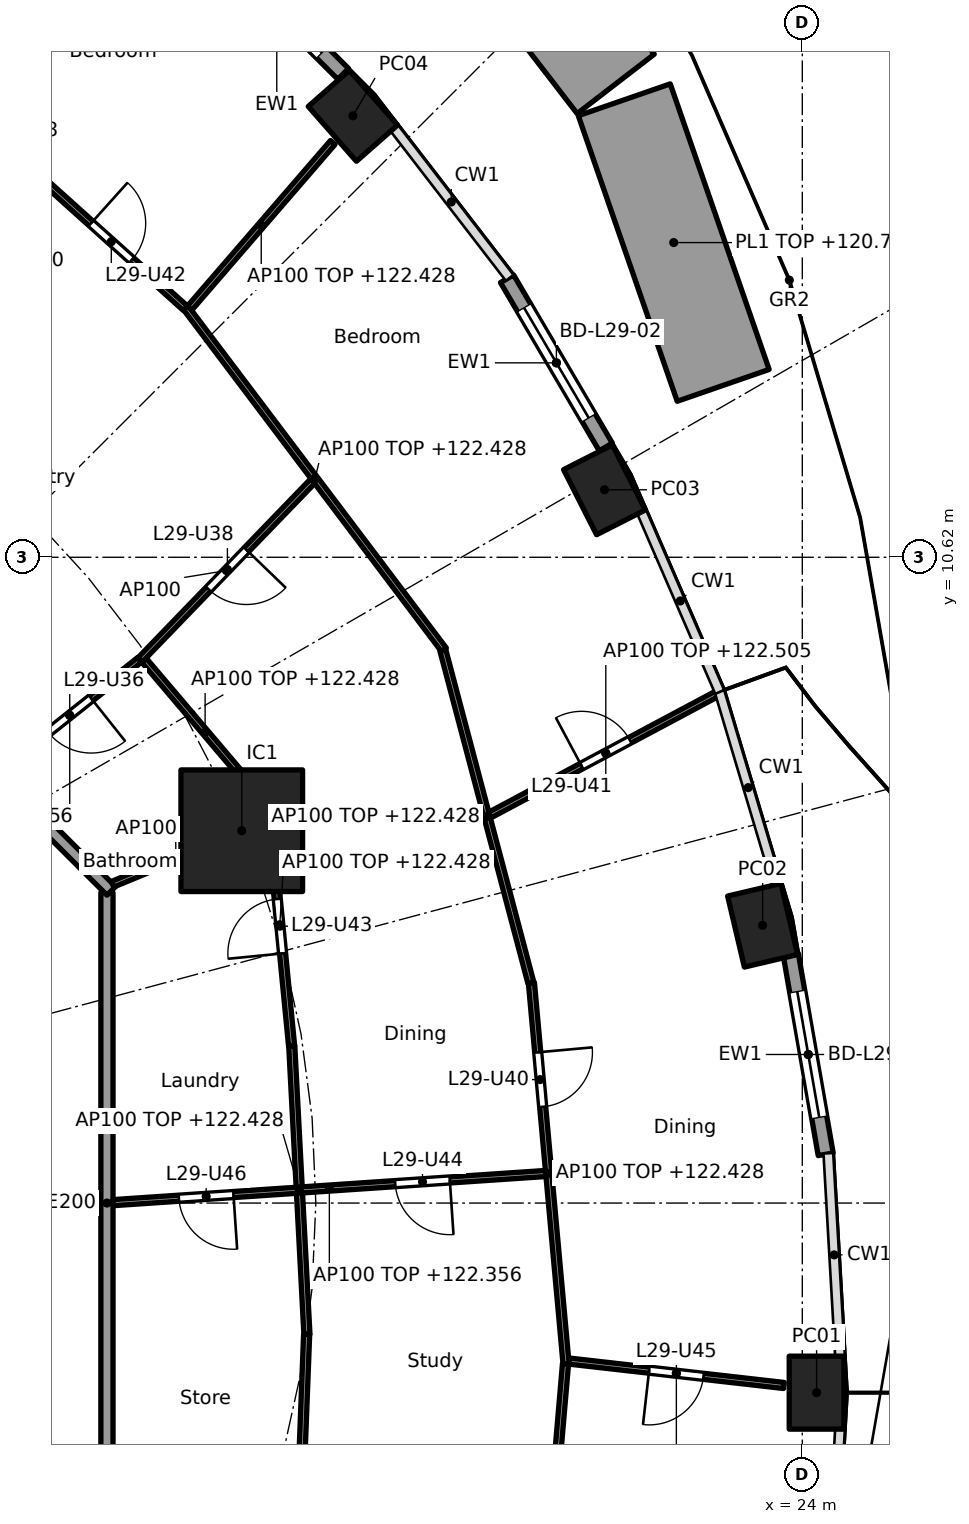
"""IFC4 building model, lengths in metres.
Left out: names, types, materials, properties, quantities, classifications, styles, units other than length and angle.
Written with IfcOpenShell. Run it as: python <this file> out.ifc"""

import sys

from ifc_helpers import new_model, si_unit, direction, frame, frame_2d, origin, origin_2d, place, context, subcontext, project, spatial, rectangle, hollow_rectangle, extrude, element, fill, save


model = new_model("IFC4")
c1 = context("Model", 3, precision=1e-05, world=origin(), true_north=direction((0.0, 1.0)))
c2 = subcontext(c1, "Body", "Model", "MODEL_VIEW")
j1 = project(units=[si_unit("LENGTHUNIT", "METRE"), si_unit("PLANEANGLEUNIT", "RADIAN")], contexts=[c1])
p1 = place(None, origin())
s1 = spatial("IfcSite", under=j1, at=p1, CompositionType="ELEMENT")
p2 = place(p1, origin())
s2 = spatial("IfcBuilding", under=s1, at=p2, CompositionType="ELEMENT")
p3 = place(p2, frame((0.0, 0.0, 119.6)))
s3 = spatial("IfcBuildingStorey", under=s2, at=p3, CompositionType="ELEMENT", Elevation=119.6)
for number, where, z_axis, x_axis in (
    (1, (24.235, -3.118, -0.26), (0.0, 0.0, 1.0), (0.0, 1.0, 0.0)),
    (2, (23.348, 4.568, -0.26), (0.0, 0.0, 1.0), (-0.229, 0.973, 0.0)),
    (3, (20.747, 11.73, -0.26), (0.0, 0.0, 1.0), (-0.452, 0.892, 0.0)),
    (4, (16.61, 17.88, -0.26), (0.0, 0.0, 1.0), (-0.66, 0.751, 0.0)),
):
    element("IfcColumn", number, at=place(p3, frame(where, z_axis=z_axis, x_axis=x_axis)), inside=s3, PredefinedType="COLUMN", context=c2, shape_type="SweptSolid", body=[
        extrude(hollow_rectangle(XDim=1.2, YDim=0.9, WallThickness=0.04, at=origin_2d()), origin(), (0.0, 0.0, 1.0), 3.96),
    ])
p4 = place(p3, frame((14.782, 6.123, 0.0), z_axis=(0.0, 0.0, 1.0), x_axis=(1.0, 0.0, 0.0)))
e5 = element("IfcColumn", 5, at=p4, inside=s3, PredefinedType="COLUMN", context=c2, shape_type="SweptSolid", body=[
    extrude(rectangle(XDim=2.0, YDim=2.0, at=origin_2d()), origin(), (0.0, 0.0, 1.0), 3.7),
])
p5 = place(p3, frame((23.811, 4.085, 0.0), z_axis=(0.0, 0.0, 1.0), x_axis=(0.172163521006, -0.985068384446, 0.0)))
e6 = element("IfcWall", 6, at=p5, inside=s3, PredefinedType="SOLIDWALL", context=c2, shape_type="SweptSolid", body=[
    extrude(rectangle(XDim=3.333, YDim=0.25, at=frame_2d((1.666, 0.0))), origin(), (0.0, 0.0, 1.0), 3.44),
])
p6 = place(p5, frame((0.616, 0.0, 0.0)))
e7 = element("IfcOpeningElement", 7, at=p6, cuts=e6, PredefinedType="OPENING", context=c2, shape_type="SweptSolid", body=[
    extrude(rectangle(XDim=2.1, YDim=2.4, at=frame_2d((1.05, 1.2))), frame((0.0, 0.135, 0.0), z_axis=(0.0, -1.0, 0.0), x_axis=(1.0, 0.0, 0.0)), (0.0, 0.0, 1.0), 0.27),
])
p7 = place(p3, frame((19.144, 15.201, 0.0), z_axis=(0.0, 0.0, 1.0), x_axis=(0.506314982873, -0.862348617508, 0.0)))
e8 = element("IfcWall", 8, at=p7, inside=s3, PredefinedType="SOLIDWALL", context=c2, shape_type="SweptSolid", body=[
    extrude(rectangle(XDim=3.208, YDim=0.25, at=frame_2d((1.604, 0.0))), origin(), (0.0, 0.0, 1.0), 3.44),
])
p8 = place(p7, frame((0.554, 0.0, 0.0)))
e9 = element("IfcOpeningElement", 9, at=p8, cuts=e8, PredefinedType="OPENING", context=c2, shape_type="SweptSolid", body=[
    extrude(rectangle(XDim=2.1, YDim=2.4, at=frame_2d((1.05, 1.2))), frame((0.0, 0.135, 0.0), z_axis=(0.0, -1.0, 0.0), x_axis=(1.0, 0.0, 0.0)), (0.0, 0.0, 1.0), 0.27),
])
p9 = place(p3, frame((14.265, 20.749, 0.0), z_axis=(0.0, 0.0, 1.0), x_axis=(0.70789728551, -0.706315392135, 0.0)))
e10 = element("IfcWall", 10, at=p9, inside=s3, PredefinedType="SOLIDWALL", context=c2, shape_type="SweptSolid", body=[
    extrude(rectangle(XDim=3.087, YDim=0.25, at=frame_2d((1.543, 0.0))), origin(), (0.0, 0.0, 1.0), 3.44),
])
p10 = place(p9, frame((0.493, 0.0, 0.0)))
e11 = element("IfcOpeningElement", 11, at=p10, cuts=e10, PredefinedType="OPENING", context=c2, shape_type="SweptSolid", body=[
    extrude(rectangle(XDim=2.1, YDim=2.4, at=frame_2d((1.05, 1.2))), frame((0.0, 0.135, 0.0), z_axis=(0.0, -1.0, 0.0), x_axis=(1.0, 0.0, 0.0)), (0.0, 0.0, 1.0), 0.27),
])
p11 = place(p3, frame((14.315, 26.993, 0.0), z_axis=(0.0, 0.0, 1.0), x_axis=(0.610279766338, -0.792185967307, 0.0)))
e12 = element("IfcWall", 12, at=p11, inside=s3, PredefinedType="SOLIDWALL", context=c2, shape_type="SweptSolid", body=[
    extrude(rectangle(XDim=10.842, YDim=1.6, at=frame_2d((5.421, 0.0))), origin(), (0.0, 0.0, 1.0), 1.1),
])
p12 = place(p3, frame((21.073, 18.143, 0.0), z_axis=(0.0, 0.0, 1.0), x_axis=(0.327215169459, -0.944949857334, 0.0)))
e13 = element("IfcWall", 13, at=p12, inside=s3, PredefinedType="SOLIDWALL", context=c2, shape_type="SweptSolid", body=[
    extrude(rectangle(XDim=4.97, YDim=1.6, at=frame_2d((2.485, 0.0))), origin(), (0.0, 0.0, 1.0), 1.1),
])
p13 = place(p3, frame((12.565, -5.104, 0.0), z_axis=(0.0, 0.0, 1.0), x_axis=(0.0, 1.0, 0.0)))
e14 = element("IfcWall", 14, at=p13, inside=s3, PredefinedType="PARTITIONING", context=c2, shape_type="SweptSolid", body=[
    extrude(rectangle(XDim=10.209, YDim=0.2, at=frame_2d((5.104, 0.0))), origin(), (0.0, 0.0, 1.0), 3.44),
])
p14 = place(p3, frame((12.635, 5.134, 0.0), z_axis=(0.0, 0.0, 1.0), x_axis=(-0.707106781187, 0.707106781187, 0.0)))
e15 = element("IfcWall", 15, at=p14, inside=s3, PredefinedType="PARTITIONING", context=c2, shape_type="SweptSolid", body=[
    extrude(rectangle(XDim=10.609, YDim=0.2, at=frame_2d((5.305, 0.0))), origin(), (0.0, 0.0, 1.0), 3.44),
])
p15 = place(p14, frame((4.804, 0.0, 0.0)))
e16 = element("IfcOpeningElement", 16, at=p15, cuts=e15, PredefinedType="OPENING", context=c2, shape_type="SweptSolid", body=[
    extrude(rectangle(XDim=1.0, YDim=2.1, at=frame_2d((0.5, 1.05))), frame((0.0, 0.11, 0.0), z_axis=(0.0, -1.0, 0.0), x_axis=(1.0, 0.0, 0.0)), (0.0, 0.0, 1.0), 0.22),
])
p16 = place(p3, frame((15.853, -2.158, 0.0), z_axis=(0.0, 0.0, 1.0), x_axis=(-0.052483289253, 0.99862180246, 0.0)))
e17 = element("IfcWall", 17, at=p16, inside=s3, PredefinedType="PARTITIONING", context=c2, shape_type="SweptSolid", body=[
    extrude(rectangle(XDim=4.75, YDim=0.1, at=frame_2d((2.375, 0.0))), origin(), (0.0, 0.0, 1.0), 2.828),
])
p17 = place(p3, frame((15.849, -2.158, 0.0), z_axis=(0.0, 0.0, 1.0), x_axis=(-0.038390448414, -0.999262815014, 0.0)))
e18 = element("IfcWall", 18, at=p17, inside=s3, PredefinedType="PARTITIONING", context=c2, shape_type="SweptSolid", body=[
    extrude(rectangle(XDim=4.394, YDim=0.1, at=frame_2d((2.197, 0.0))), origin(), (0.0, 0.0, 1.0), 3.44),
])
p18 = place(p3, frame((20.16, -2.598, 0.0), z_axis=(0.0, 0.0, 1.0), x_axis=(0.993610673305, -0.112861994911, 0.0)))
e19 = element("IfcWall", 19, at=p18, inside=s3, PredefinedType="PARTITIONING", context=c2, shape_type="SweptSolid", body=[
    extrude(rectangle(XDim=3.561, YDim=0.1, at=frame_2d((1.78, 0.0))), origin(), (0.0, 0.0, 1.0), 2.828),
])
p19 = place(p18, frame((1.33, 0.0, 0.0)))
e20 = element("IfcOpeningElement", 20, at=p19, cuts=e19, PredefinedType="OPENING", context=c2, shape_type="SweptSolid", body=[
    extrude(rectangle(XDim=0.9, YDim=2.1, at=frame_2d((0.45, 1.05))), frame((0.0, 0.06, 0.0), z_axis=(0.0, -1.0, 0.0), x_axis=(1.0, 0.0, 0.0)), (0.0, 0.0, 1.0), 0.12),
])
p20 = place(p3, frame((20.115, -2.642, 0.0), z_axis=(0.0, 0.0, 1.0), x_axis=(-0.090563746294, 0.995890660593, 0.0)))
e21 = element("IfcWall", 21, at=p20, inside=s3, PredefinedType="PARTITIONING", context=c2, shape_type="SweptSolid", body=[
    extrude(rectangle(XDim=6.289, YDim=0.1, at=frame_2d((3.145, 0.0))), origin(), (0.0, 0.0, 1.0), 2.828),
])
p21 = place(p20, frame((4.242, 0.0, 0.0)))
e22 = element("IfcOpeningElement", 22, at=p21, cuts=e21, PredefinedType="OPENING", context=c2, shape_type="SweptSolid", body=[
    extrude(rectangle(XDim=0.9, YDim=2.1, at=frame_2d((0.45, 1.05))), frame((0.0, 0.06, 0.0), z_axis=(0.0, -1.0, 0.0), x_axis=(1.0, 0.0, 0.0)), (0.0, 0.0, 1.0), 0.12),
])
p22 = place(p3, frame((20.106, -2.642, 0.0), z_axis=(0.0, 0.0, 1.0), x_axis=(-0.085672025822, -0.996323393277, 0.0)))
e23 = element("IfcWall", 23, at=p22, inside=s3, PredefinedType="PARTITIONING", context=c2, shape_type="SweptSolid", body=[
    extrude(rectangle(XDim=6.007, YDim=0.1, at=frame_2d((3.003, 0.0))), origin(), (0.0, 0.0, 1.0), 2.828),
])
p23 = place(p3, frame((12.665, 0.007, 0.0), z_axis=(0.0, 0.0, 1.0), x_axis=(0.997737186236, 0.067234717233, 0.0)))
e24 = element("IfcWall", 24, at=p23, inside=s3, PredefinedType="PARTITIONING", context=c2, shape_type="SweptSolid", body=[
    extrude(rectangle(XDim=7.132, YDim=0.1, at=frame_2d((3.566, 0.0))), origin(), (0.0, 0.0, 1.0), 2.756),
])
p24 = place(p23, frame((4.651, 0.0, 0.0)))
e25 = element("IfcOpeningElement", 25, at=p24, cuts=e24, PredefinedType="OPENING", context=c2, shape_type="SweptSolid", body=[
    extrude(rectangle(XDim=0.9, YDim=2.1, at=frame_2d((0.45, 1.05))), frame((0.0, 0.06, 0.0), z_axis=(0.0, -1.0, 0.0), x_axis=(1.0, 0.0, 0.0)), (0.0, 0.0, 1.0), 0.12),
])
p25 = place(p23, frame((1.085, 0.0, 0.0)))
e26 = element("IfcOpeningElement", 26, at=p25, cuts=e24, PredefinedType="OPENING", context=c2, shape_type="SweptSolid", body=[
    extrude(rectangle(XDim=0.9, YDim=2.1, at=frame_2d((0.45, 1.05))), frame((0.0, 0.06, 0.0), z_axis=(0.0, -1.0, 0.0), x_axis=(1.0, 0.0, 0.0)), (0.0, 0.0, 1.0), 0.12),
])
p26 = place(p3, frame((15.602, 2.584, 0.0), z_axis=(0.0, 0.0, 1.0), x_axis=(-0.097216297846, 0.995263277446, 0.0)))
e27 = element("IfcWall", 27, at=p26, inside=s3, PredefinedType="PARTITIONING", context=c2, shape_type="SweptSolid", body=[
    extrude(rectangle(XDim=4.006, YDim=0.1, at=frame_2d((2.003, 0.0))), origin(), (0.0, 0.0, 1.0), 2.828),
])
p27 = place(p26, frame((1.528, 0.0, 0.0)))
e28 = element("IfcOpeningElement", 28, at=p27, cuts=e27, PredefinedType="OPENING", context=c2, shape_type="SweptSolid", body=[
    extrude(rectangle(XDim=0.9, YDim=2.1, at=frame_2d((0.45, 1.05))), frame((0.0, 0.06, 0.0), z_axis=(0.0, -1.0, 0.0), x_axis=(1.0, 0.0, 0.0)), (0.0, 0.0, 1.0), 0.12),
])
p28 = place(p3, frame((19.537, 3.62, 0.0), z_axis=(0.0, 0.0, 1.0), x_axis=(-0.255892560316, 0.966705227862, 0.0)))
e29 = element("IfcWall", 29, at=p28, inside=s3, PredefinedType="PARTITIONING", context=c2, shape_type="SweptSolid", body=[
    extrude(rectangle(XDim=5.659, YDim=0.1, at=frame_2d((2.829, 0.0))), origin(), (0.0, 0.0, 1.0), 2.828),
])
p29 = place(p3, frame((18.857, 6.378, 0.0), z_axis=(0.0, 0.0, 1.0), x_axis=(0.882223462934, 0.470830926607, 0.0)))
e30 = element("IfcWall", 30, at=p29, inside=s3, PredefinedType="PARTITIONING", context=c2, shape_type="SweptSolid", body=[
    extrude(rectangle(XDim=4.333, YDim=0.1, at=frame_2d((2.167, 0.0))), origin(), (0.0, 0.0, 1.0), 2.905),
])
p30 = place(p29, frame((1.717, 0.0, 0.0)))
e31 = element("IfcOpeningElement", 31, at=p30, cuts=e30, PredefinedType="OPENING", context=c2, shape_type="SweptSolid", body=[
    extrude(rectangle(XDim=0.9, YDim=2.1, at=frame_2d((0.45, 1.05))), frame((0.0, 0.06, 0.0), z_axis=(0.0, -1.0, 0.0), x_axis=(1.0, 0.0, 0.0)), (0.0, 0.0, 1.0), 0.12),
])
p31 = place(p3, frame((12.657, 5.243, 0.0), z_axis=(0.0, 0.0, 1.0), x_axis=(0.923864733477, 0.382719158442, 0.0)))
e32 = element("IfcWall", 32, at=p31, inside=s3, PredefinedType="PARTITIONING", context=c2, shape_type="SweptSolid", body=[
    extrude(rectangle(XDim=2.25, YDim=0.1, at=frame_2d((1.125, 0.0))), origin(), (0.0, 0.0, 1.0), 3.44),
])
p32 = place(p3, frame((15.185, 6.559, 0.0), z_axis=(0.0, 0.0, 1.0), x_axis=(-0.647360926376, 0.762183594026, 0.0)))
e33 = element("IfcWall", 33, at=p32, inside=s3, PredefinedType="PARTITIONING", context=c2, shape_type="SweptSolid", body=[
    extrude(rectangle(XDim=3.106, YDim=0.1, at=frame_2d((1.553, 0.0))), origin(), (0.0, 0.0, 1.0), 2.828),
])
p33 = place(p3, frame((18.106, 9.098, 0.0), z_axis=(0.0, 0.0, 1.0), x_axis=(-0.602398572907, 0.798195439325, 0.0)))
e34 = element("IfcWall", 34, at=p33, inside=s3, PredefinedType="PARTITIONING", context=c2, shape_type="SweptSolid", body=[
    extrude(rectangle(XDim=7.044, YDim=0.1, at=frame_2d((3.522, 0.0))), origin(), (0.0, 0.0, 1.0), 2.828),
])
p34 = place(p3, frame((10.803, 7.107, 0.0), z_axis=(0.0, 0.0, 1.0), x_axis=(0.782908385935, 0.622137010017, 0.0)))
e35 = element("IfcWall", 35, at=p34, inside=s3, PredefinedType="PARTITIONING", context=c2, shape_type="SweptSolid", body=[
    extrude(rectangle(XDim=2.937, YDim=0.1, at=frame_2d((1.469, 0.0))), origin(), (0.0, 0.0, 1.0), 2.756),
])
p35 = place(p34, frame((1.019, 0.0, 0.0)))
e36 = element("IfcOpeningElement", 36, at=p35, cuts=e35, PredefinedType="OPENING", context=c2, shape_type="SweptSolid", body=[
    extrude(rectangle(XDim=0.9, YDim=2.1, at=frame_2d((0.45, 1.05))), frame((0.0, 0.06, 0.0), z_axis=(0.0, -1.0, 0.0), x_axis=(1.0, 0.0, 0.0)), (0.0, 0.0, 1.0), 0.12),
])
p36 = place(p3, frame((13.107, 8.929, 0.0), z_axis=(0.0, 0.0, 1.0), x_axis=(0.694592384931, 0.719403515974, 0.0)))
e37 = element("IfcWall", 37, at=p36, inside=s3, PredefinedType="PARTITIONING", context=c2, shape_type="SweptSolid", body=[
    extrude(rectangle(XDim=4.094, YDim=0.1, at=frame_2d((2.047, 0.0))), origin(), (0.0, 0.0, 1.0), 3.44),
])
p37 = place(p36, frame((1.622, 0.0, 0.0)))
e38 = element("IfcOpeningElement", 38, at=p37, cuts=e37, PredefinedType="OPENING", context=c2, shape_type="SweptSolid", body=[
    extrude(rectangle(XDim=0.9, YDim=2.1, at=frame_2d((0.45, 1.05))), frame((0.0, 0.06, 0.0), z_axis=(0.0, -1.0, 0.0), x_axis=(1.0, 0.0, 0.0)), (0.0, 0.0, 1.0), 0.12),
])
p38 = place(p3, frame((13.926, 14.719, 0.0), z_axis=(0.0, 0.0, 1.0), x_axis=(0.653831857253, 0.756639876323, 0.0)))
e39 = element("IfcWall", 39, at=p38, inside=s3, PredefinedType="PARTITIONING", context=c2, shape_type="SweptSolid", body=[
    extrude(rectangle(XDim=3.598, YDim=0.1, at=frame_2d((1.799, 0.0))), origin(), (0.0, 0.0, 1.0), 2.828),
])
p39 = place(p3, frame((13.856, 14.714, 0.0), z_axis=(0.0, 0.0, 1.0), x_axis=(-0.743799395746, 0.668402916577, 0.0)))
e40 = element("IfcWall", 40, at=p39, inside=s3, PredefinedType="PARTITIONING", context=c2, shape_type="SweptSolid", body=[
    extrude(rectangle(XDim=6.509, YDim=0.1, at=frame_2d((3.254, 0.0))), origin(), (0.0, 0.0, 1.0), 2.828),
])
p40 = place(p39, frame((1.19, 0.0, 0.0)))
e41 = element("IfcOpeningElement", 41, at=p40, cuts=e40, PredefinedType="OPENING", context=c2, shape_type="SweptSolid", body=[
    extrude(rectangle(XDim=0.9, YDim=2.1, at=frame_2d((0.45, 1.05))), frame((0.0, 0.06, 0.0), z_axis=(0.0, -1.0, 0.0), x_axis=(1.0, 0.0, 0.0)), (0.0, 0.0, 1.0), 0.12),
])
p41 = place(p6, origin())
e42 = element("IfcDoor", 42, at=p41, inside=s3, OperationType="SLIDING_TO_LEFT", PredefinedType="DOOR", context=c2, shape_type="SweptSolid", body=[
    extrude(rectangle(XDim=2.1, YDim=2.4, at=frame_2d((1.05, 1.2))), frame((0.0, 0.025, 0.0), z_axis=(0.0, -1.0, 0.0), x_axis=(1.0, 0.0, 0.0)), (0.0, 0.0, 1.0), 0.05),
])
fill(e7, e42)
p42 = place(p8, origin())
e43 = element("IfcDoor", 43, at=p42, inside=s3, OperationType="SLIDING_TO_LEFT", PredefinedType="DOOR", context=c2, shape_type="SweptSolid", body=[
    extrude(rectangle(XDim=2.1, YDim=2.4, at=frame_2d((1.05, 1.2))), frame((0.0, 0.025, 0.0), z_axis=(0.0, -1.0, 0.0), x_axis=(1.0, 0.0, 0.0)), (0.0, 0.0, 1.0), 0.05),
])
fill(e9, e43)
p43 = place(p10, origin())
e44 = element("IfcDoor", 44, at=p43, inside=s3, OperationType="SLIDING_TO_LEFT", PredefinedType="DOOR", context=c2, shape_type="SweptSolid", body=[
    extrude(rectangle(XDim=2.1, YDim=2.4, at=frame_2d((1.05, 1.2))), frame((0.0, 0.025, 0.0), z_axis=(0.0, -1.0, 0.0), x_axis=(1.0, 0.0, 0.0)), (0.0, 0.0, 1.0), 0.05),
])
fill(e11, e44)
p44 = place(p35, frame((0.9, 0.0, 0.0), x_axis=(-1.0, 0.0, 0.0)))
e45 = element("IfcDoor", 45, at=p44, inside=s3, OperationType="SINGLE_SWING_LEFT", PredefinedType="DOOR", context=c2, shape_type="SweptSolid", body=[
    extrude(rectangle(XDim=0.9, YDim=2.1, at=frame_2d((0.45, 1.05))), frame((0.0, 0.025, 0.0), z_axis=(0.0, -1.0, 0.0), x_axis=(1.0, 0.0, 0.0)), (0.0, 0.0, 1.0), 0.05),
])
fill(e36, e45)
p45 = place(p37, frame((0.9, 0.0, 0.0), x_axis=(-1.0, 0.0, 0.0)))
e46 = element("IfcDoor", 46, at=p45, inside=s3, OperationType="SINGLE_SWING_LEFT", PredefinedType="DOOR", context=c2, shape_type="SweptSolid", body=[
    extrude(rectangle(XDim=0.9, YDim=2.1, at=frame_2d((0.45, 1.05))), frame((0.0, 0.025, 0.0), z_axis=(0.0, -1.0, 0.0), x_axis=(1.0, 0.0, 0.0)), (0.0, 0.0, 1.0), 0.05),
])
fill(e38, e46)
p46 = place(p21, frame((0.9, 0.0, 0.0), x_axis=(-1.0, 0.0, 0.0)))
e47 = element("IfcDoor", 47, at=p46, inside=s3, OperationType="SINGLE_SWING_LEFT", PredefinedType="DOOR", context=c2, shape_type="SweptSolid", body=[
    extrude(rectangle(XDim=0.9, YDim=2.1, at=frame_2d((0.45, 1.05))), frame((0.0, 0.025, 0.0), z_axis=(0.0, -1.0, 0.0), x_axis=(1.0, 0.0, 0.0)), (0.0, 0.0, 1.0), 0.05),
])
fill(e22, e47)
p47 = place(p30, origin())
e48 = element("IfcDoor", 48, at=p47, inside=s3, OperationType="SINGLE_SWING_LEFT", PredefinedType="DOOR", context=c2, shape_type="SweptSolid", body=[
    extrude(rectangle(XDim=0.9, YDim=2.1, at=frame_2d((0.45, 1.05))), frame((0.0, 0.025, 0.0), z_axis=(0.0, -1.0, 0.0), x_axis=(1.0, 0.0, 0.0)), (0.0, 0.0, 1.0), 0.05),
])
fill(e31, e48)
p48 = place(p40, frame((0.9, 0.0, 0.0), x_axis=(-1.0, 0.0, 0.0)))
e49 = element("IfcDoor", 49, at=p48, inside=s3, OperationType="SINGLE_SWING_LEFT", PredefinedType="DOOR", context=c2, shape_type="SweptSolid", body=[
    extrude(rectangle(XDim=0.9, YDim=2.1, at=frame_2d((0.45, 1.05))), frame((0.0, 0.025, 0.0), z_axis=(0.0, -1.0, 0.0), x_axis=(1.0, 0.0, 0.0)), (0.0, 0.0, 1.0), 0.05),
])
fill(e41, e49)
p49 = place(p27, origin())
e50 = element("IfcDoor", 50, at=p49, inside=s3, OperationType="SINGLE_SWING_LEFT", PredefinedType="DOOR", context=c2, shape_type="SweptSolid", body=[
    extrude(rectangle(XDim=0.9, YDim=2.1, at=frame_2d((0.45, 1.05))), frame((0.0, 0.025, 0.0), z_axis=(0.0, -1.0, 0.0), x_axis=(1.0, 0.0, 0.0)), (0.0, 0.0, 1.0), 0.05),
])
fill(e28, e50)
p50 = place(p24, frame((0.9, 0.0, 0.0), x_axis=(-1.0, 0.0, 0.0)))
e51 = element("IfcDoor", 51, at=p50, inside=s3, OperationType="SINGLE_SWING_LEFT", PredefinedType="DOOR", context=c2, shape_type="SweptSolid", body=[
    extrude(rectangle(XDim=0.9, YDim=2.1, at=frame_2d((0.45, 1.05))), frame((0.0, 0.025, 0.0), z_axis=(0.0, -1.0, 0.0), x_axis=(1.0, 0.0, 0.0)), (0.0, 0.0, 1.0), 0.05),
])
fill(e25, e51)
p51 = place(p19, frame((0.9, 0.0, 0.0), x_axis=(-1.0, 0.0, 0.0)))
e52 = element("IfcDoor", 52, at=p51, inside=s3, OperationType="SINGLE_SWING_RIGHT", PredefinedType="DOOR", context=c2, shape_type="SweptSolid", body=[
    extrude(rectangle(XDim=0.9, YDim=2.1, at=frame_2d((0.45, 1.05))), frame((0.0, 0.025, 0.0), z_axis=(0.0, -1.0, 0.0), x_axis=(1.0, 0.0, 0.0)), (0.0, 0.0, 1.0), 0.05),
])
fill(e20, e52)
p52 = place(p25, frame((0.9, 0.0, 0.0), x_axis=(-1.0, 0.0, 0.0)))
e53 = element("IfcDoor", 53, at=p52, inside=s3, OperationType="SINGLE_SWING_LEFT", PredefinedType="DOOR", context=c2, shape_type="SweptSolid", body=[
    extrude(rectangle(XDim=0.9, YDim=2.1, at=frame_2d((0.45, 1.05))), frame((0.0, 0.025, 0.0), z_axis=(0.0, -1.0, 0.0), x_axis=(1.0, 0.0, 0.0)), (0.0, 0.0, 1.0), 0.05),
])
fill(e26, e53)
save(model, sys.argv[1])
